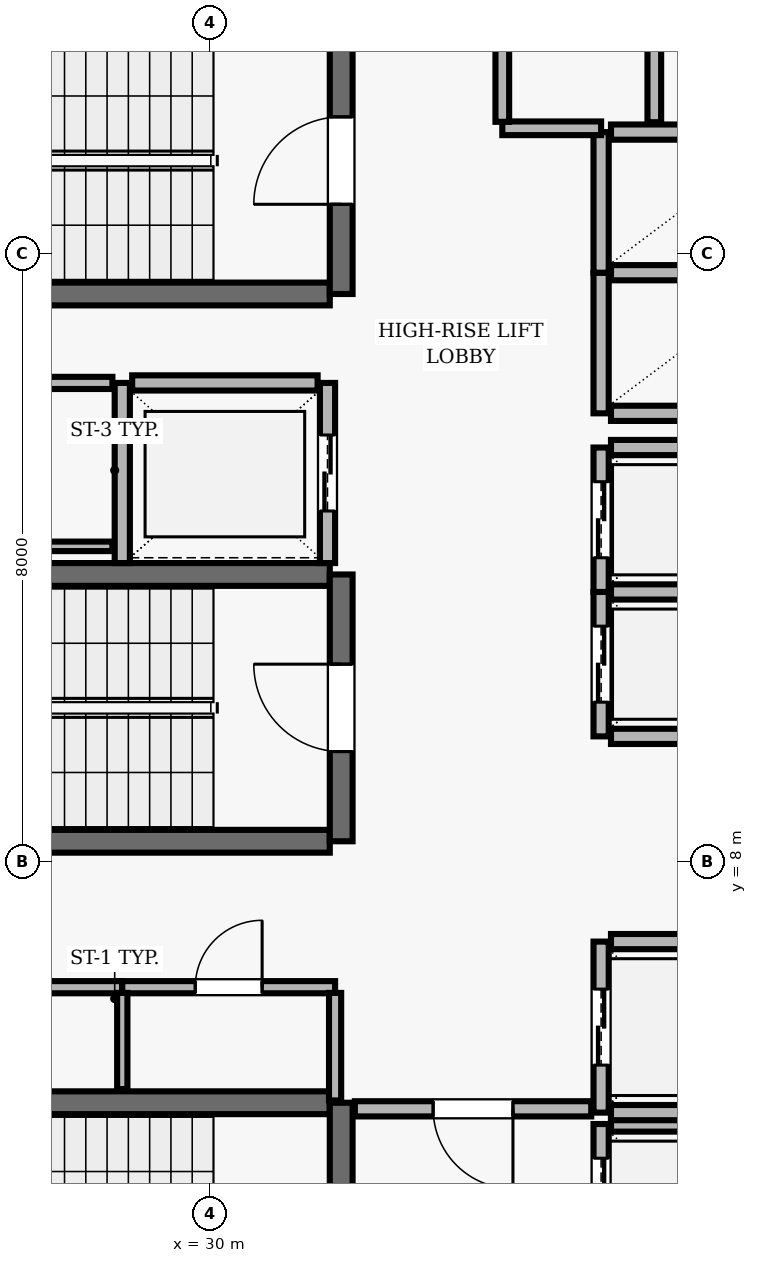
"""IFC4 building model, lengths in metres.
Left out: names, types, materials, properties, quantities, classifications, styles, units other than length and angle.
Written with IfcOpenShell. Run it as: python <this file> out.ifc"""

import sys

from ifc_helpers import new_model, si_unit, direction, frame, frame_2d, origin, place, context, subcontext, project, spatial, rectangle, extrude, element, fill, save


model = new_model("IFC4")
c1 = context("Model", 3, precision=1e-05, world=origin(), true_north=direction((0.0, 1.0)))
c2 = subcontext(c1, "Body", "Model", "MODEL_VIEW")
j1 = project(units=[si_unit("LENGTHUNIT", "METRE"), si_unit("PLANEANGLEUNIT", "RADIAN")], contexts=[c1])
p1 = place(None, origin())
s1 = spatial("IfcSite", under=j1, at=p1, CompositionType="ELEMENT")
p2 = place(p1, origin())
s2 = spatial("IfcBuilding", under=s1, at=p2, CompositionType="ELEMENT")
p3 = place(p2, frame((0.0, 0.0, 298.9)))
s3 = spatial("IfcBuildingStorey", under=s2, at=p3, CompositionType="ELEMENT", Elevation=298.9)
p4 = place(p3, frame((31.58, 4.83, 0.0), z_axis=(0.0, 0.0, 1.0), x_axis=(-1.0, 0.0, 0.0)))
e1 = element("IfcWall", 1, at=p4, inside=s3, PredefinedType="SHEAR", context=c2, shape_type="SweptSolid", body=[
    extrude(rectangle(XDim=8.36, YDim=0.3, at=frame_2d((4.18, 0.0))), origin(), (0.0, 0.0, 1.0), 3.69),
])
p5 = place(p3, frame((31.73, 0.96, 0.0), z_axis=(0.0, 0.0, 1.0), x_axis=(0.0, 1.0, 0.0)))
e2 = element("IfcWall", 2, at=p5, inside=s3, PredefinedType="SHEAR", context=c2, shape_type="SweptSolid", body=[
    extrude(rectangle(XDim=3.87, YDim=0.3, at=frame_2d((1.935, 0.0))), origin(), (0.0, 0.0, 1.0), 3.69),
])
p6 = place(p5, frame((1.54, 0.0, 0.0)))
e3 = element("IfcOpeningElement", 3, at=p6, cuts=e2, PredefinedType="OPENING", context=c2, shape_type="SweptSolid", body=[
    extrude(rectangle(XDim=1.15, YDim=2.15, at=frame_2d((0.575, 1.075))), frame((0.0, 0.16, 0.0), z_axis=(0.0, -1.0, 0.0), x_axis=(1.0, 0.0, 0.0)), (0.0, 0.0, 1.0), 0.32),
])
p7 = place(p3, frame((23.22, 15.47, 0.0), z_axis=(0.0, 0.0, 1.0), x_axis=(1.0, 0.0, 0.0)))
e4 = element("IfcWall", 4, at=p7, inside=s3, PredefinedType="SHEAR", context=c2, shape_type="SweptSolid", body=[
    extrude(rectangle(XDim=8.36, YDim=0.3, at=frame_2d((4.18, 0.0))), origin(), (0.0, 0.0, 1.0), 3.69),
])
p8 = place(p3, frame((31.73, 15.47, 0.0), z_axis=(0.0, 0.0, 1.0), x_axis=(0.0, 1.0, 0.0)))
e5 = element("IfcWall", 5, at=p8, inside=s3, PredefinedType="SHEAR", context=c2, shape_type="SweptSolid", body=[
    extrude(rectangle(XDim=3.51, YDim=0.3, at=frame_2d((1.755, 0.0))), origin(), (0.0, 0.0, 1.0), 3.69),
])
p9 = place(p8, frame((1.18, 0.0, 0.0)))
e6 = element("IfcOpeningElement", 6, at=p9, cuts=e5, PredefinedType="OPENING", context=c2, shape_type="SweptSolid", body=[
    extrude(rectangle(XDim=1.15, YDim=2.15, at=frame_2d((0.575, 1.075))), frame((0.0, 0.16, 0.0), z_axis=(0.0, -1.0, 0.0), x_axis=(1.0, 0.0, 0.0)), (0.0, 0.0, 1.0), 0.32),
])
for number, where, z_axis, x_axis in (
    (7, (31.58, 11.78, 0.0), (0.0, 0.0, 1.0), (-1.0, 0.0, 0.0)),
    (8, (23.22, 8.27, 0.0), (0.0, 0.0, 1.0), (1.0, 0.0, 0.0)),
):
    element("IfcWall", number, at=place(p3, frame(where, z_axis=z_axis, x_axis=x_axis)), inside=s3, PredefinedType="SHEAR", context=c2, shape_type="SweptSolid", body=[
        extrude(rectangle(XDim=8.36, YDim=0.3, at=frame_2d((4.18, 0.0))), origin(), (0.0, 0.0, 1.0), 3.69),
    ])
p10 = place(p3, frame((31.73, 8.27, 0.0), z_axis=(0.0, 0.0, 1.0), x_axis=(0.0, 1.0, 0.0)))
e9 = element("IfcWall", 9, at=p10, inside=s3, PredefinedType="SHEAR", context=c2, shape_type="SweptSolid", body=[
    extrude(rectangle(XDim=3.51, YDim=0.3, at=frame_2d((1.755, 0.0))), origin(), (0.0, 0.0, 1.0), 3.69),
])
p11 = place(p10, frame((1.18, 0.0, 0.0)))
e10 = element("IfcOpeningElement", 10, at=p11, cuts=e9, PredefinedType="OPENING", context=c2, shape_type="SweptSolid", body=[
    extrude(rectangle(XDim=1.15, YDim=2.15, at=frame_2d((0.575, 1.075))), frame((0.0, 0.16, 0.0), z_axis=(0.0, -1.0, 0.0), x_axis=(1.0, 0.0, 0.0)), (0.0, 0.0, 1.0), 0.32),
])
p12 = place(p3, frame((35.15, 4.55, 0.0), z_axis=(0.0, 0.0, 1.0), x_axis=(0.0, -1.0, 0.0)))
e11 = element("IfcWall", 11, at=p12, inside=s3, PredefinedType="SOLIDWALL", context=c2, shape_type="SweptSolid", body=[
    extrude(rectangle(XDim=2.1, YDim=0.2, at=frame_2d((1.05, 0.0))), origin(), (0.0, 0.0, 1.0), 3.69),
])
p13 = place(p12, frame((0.45, 0.0, 0.0)))
e12 = element("IfcOpeningElement", 12, at=p13, cuts=e11, PredefinedType="OPENING", context=c2, shape_type="SweptSolid", body=[
    extrude(rectangle(XDim=1.2, YDim=2.15, at=frame_2d((0.6, 1.075))), frame((0.0, 0.11, 0.0), z_axis=(0.0, -1.0, 0.0), x_axis=(1.0, 0.0, 0.0)), (0.0, 0.0, 1.0), 0.22),
])
p14 = place(p3, frame((37.42, 4.55, 0.0), z_axis=(0.0, 0.0, 1.0), x_axis=(-1.0, 0.0, 0.0)))
e13 = element("IfcWall", 13, at=p14, inside=s3, PredefinedType="SOLIDWALL", context=c2, shape_type="SweptSolid", body=[
    extrude(rectangle(XDim=2.14, YDim=0.2, at=frame_2d((1.07, 0.0))), origin(), (0.0, 0.0, 1.0), 3.69),
])
p15 = place(p3, frame((35.15, 6.95, 0.0), z_axis=(0.0, 0.0, 1.0), x_axis=(0.0, -1.0, 0.0)))
e14 = element("IfcWall", 14, at=p15, inside=s3, PredefinedType="SOLIDWALL", context=c2, shape_type="SweptSolid", body=[
    extrude(rectangle(XDim=2.25, YDim=0.2, at=frame_2d((1.125, 0.0))), origin(), (0.0, 0.0, 1.0), 3.69),
])
p16 = place(p15, frame((0.625, 0.0, 0.0)))
e15 = element("IfcOpeningElement", 15, at=p16, cuts=e14, PredefinedType="OPENING", context=c2, shape_type="SweptSolid", body=[
    extrude(rectangle(XDim=1.0, YDim=2.1, at=frame_2d((0.5, 1.05))), frame((0.0, 0.11, 0.0), z_axis=(0.0, -1.0, 0.0), x_axis=(1.0, 0.0, 0.0)), (0.0, 0.0, 1.0), 0.22),
])
for number, where, z_axis, x_axis in (
    (16, (35.28, 4.7, 0.0), (0.0, 0.0, 1.0), (1.0, 0.0, 0.0)),
    (17, (37.42, 6.95, 0.0), (0.0, 0.0, 1.0), (-1.0, 0.0, 0.0)),
):
    element("IfcWall", number, at=place(p3, frame(where, z_axis=z_axis, x_axis=x_axis)), inside=s3, PredefinedType="SOLIDWALL", context=c2, shape_type="SweptSolid", body=[
        extrude(rectangle(XDim=2.14, YDim=0.2, at=frame_2d((1.07, 0.0))), origin(), (0.0, 0.0, 1.0), 3.69),
    ])
p17 = place(p3, frame((35.15, 11.55, 0.0), z_axis=(0.0, 0.0, 1.0), x_axis=(0.0, -1.0, 0.0)))
e18 = element("IfcWall", 18, at=p17, inside=s3, PredefinedType="SOLIDWALL", context=c2, shape_type="SweptSolid", body=[
    extrude(rectangle(XDim=1.9, YDim=0.2, at=frame_2d((0.95, 0.0))), origin(), (0.0, 0.0, 1.0), 3.69),
])
p18 = place(p17, frame((0.45, 0.0, 0.0)))
e19 = element("IfcOpeningElement", 19, at=p18, cuts=e18, PredefinedType="OPENING", context=c2, shape_type="SweptSolid", body=[
    extrude(rectangle(XDim=1.0, YDim=2.1, at=frame_2d((0.5, 1.05))), frame((0.0, 0.11, 0.0), z_axis=(0.0, -1.0, 0.0), x_axis=(1.0, 0.0, 0.0)), (0.0, 0.0, 1.0), 0.22),
])
for number, where, z_axis, x_axis in (
    (20, (35.28, 9.65, 0.0), (0.0, 0.0, 1.0), (1.0, 0.0, 0.0)),
    (21, (37.42, 11.55, 0.0), (0.0, 0.0, 1.0), (-1.0, 0.0, 0.0)),
):
    element("IfcWall", number, at=place(p3, frame(where, z_axis=z_axis, x_axis=x_axis)), inside=s3, PredefinedType="SOLIDWALL", context=c2, shape_type="SweptSolid", body=[
        extrude(rectangle(XDim=2.14, YDim=0.2, at=frame_2d((1.07, 0.0))), origin(), (0.0, 0.0, 1.0), 3.69),
    ])
p19 = place(p3, frame((35.15, 13.45, 0.0), z_axis=(0.0, 0.0, 1.0), x_axis=(0.0, -1.0, 0.0)))
e22 = element("IfcWall", 22, at=p19, inside=s3, PredefinedType="SOLIDWALL", context=c2, shape_type="SweptSolid", body=[
    extrude(rectangle(XDim=1.9, YDim=0.2, at=frame_2d((0.95, 0.0))), origin(), (0.0, 0.0, 1.0), 3.69),
])
p20 = place(p19, frame((0.45, 0.0, 0.0)))
e23 = element("IfcOpeningElement", 23, at=p20, cuts=e22, PredefinedType="OPENING", context=c2, shape_type="SweptSolid", body=[
    extrude(rectangle(XDim=1.0, YDim=2.1, at=frame_2d((0.5, 1.05))), frame((0.0, 0.11, 0.0), z_axis=(0.0, -1.0, 0.0), x_axis=(1.0, 0.0, 0.0)), (0.0, 0.0, 1.0), 0.22),
])
p21 = place(p3, frame((37.42, 13.45, 0.0), z_axis=(0.0, 0.0, 1.0), x_axis=(-1.0, 0.0, 0.0)))
e24 = element("IfcWall", 24, at=p21, inside=s3, PredefinedType="SOLIDWALL", context=c2, shape_type="SweptSolid", body=[
    extrude(rectangle(XDim=2.14, YDim=0.2, at=frame_2d((1.07, 0.0))), origin(), (0.0, 0.0, 1.0), 3.69),
])
p22 = place(p3, frame((28.85, 14.3, 0.0), z_axis=(0.0, 0.0, 1.0), x_axis=(0.0, -1.0, 0.0)))
e25 = element("IfcWall", 25, at=p22, inside=s3, PredefinedType="SOLIDWALL", context=c2, shape_type="SweptSolid", body=[
    extrude(rectangle(XDim=2.37, YDim=0.2, at=frame_2d((1.185, 0.0))), origin(), (0.0, 0.0, 1.0), 3.69),
])
p23 = place(p3, frame((31.55, 11.93, 0.0), z_axis=(0.0, 0.0, 1.0), x_axis=(0.0, 1.0, 0.0)))
e26 = element("IfcWall", 26, at=p23, inside=s3, PredefinedType="SOLIDWALL", context=c2, shape_type="SweptSolid", body=[
    extrude(rectangle(XDim=2.37, YDim=0.2, at=frame_2d((1.185, 0.0))), origin(), (0.0, 0.0, 1.0), 3.69),
])
p24 = place(p23, frame((0.685, 0.0, 0.0)))
e27 = element("IfcOpeningElement", 27, at=p24, cuts=e26, PredefinedType="OPENING", context=c2, shape_type="SweptSolid", body=[
    extrude(rectangle(XDim=1.0, YDim=2.1, at=frame_2d((0.5, 1.05))), frame((0.0, 0.11, 0.0), z_axis=(0.0, -1.0, 0.0), x_axis=(1.0, 0.0, 0.0)), (0.0, 0.0, 1.0), 0.22),
])
p25 = place(p3, frame((31.42, 14.3, 0.0), z_axis=(0.0, 0.0, 1.0), x_axis=(-1.0, 0.0, 0.0)))
e28 = element("IfcWall", 28, at=p25, inside=s3, PredefinedType="SOLIDWALL", context=c2, shape_type="SweptSolid", body=[
    extrude(rectangle(XDim=2.44, YDim=0.2, at=frame_2d((1.22, 0.0))), origin(), (0.0, 0.0, 1.0), 3.69),
])
p26 = place(p3, frame((35.15, 15.75, 0.0), z_axis=(0.0, 0.0, 1.0), x_axis=(0.0, -1.0, 0.0)))
e29 = element("IfcWall", 29, at=p26, inside=s3, PredefinedType="SOLIDWALL", context=c2, shape_type="SweptSolid", body=[
    extrude(rectangle(XDim=1.85, YDim=0.2, at=frame_2d((0.925, 0.0))), origin(), (0.0, 0.0, 1.0), 3.69),
])
for number, where, z_axis, x_axis in (
    (30, (35.28, 13.9, 0.0), (0.0, 0.0, 1.0), (1.0, 0.0, 0.0)),
    (31, (37.42, 15.75, 0.0), (0.0, 0.0, 1.0), (-1.0, 0.0, 0.0)),
):
    element("IfcWall", number, at=place(p3, frame(where, z_axis=z_axis, x_axis=x_axis)), inside=s3, PredefinedType="SOLIDWALL", context=c2, shape_type="SweptSolid", body=[
        extrude(rectangle(XDim=2.14, YDim=0.2, at=frame_2d((1.07, 0.0))), origin(), (0.0, 0.0, 1.0), 3.69),
    ])
p27 = place(p3, frame((35.15, 17.6, 0.0), z_axis=(0.0, 0.0, 1.0), x_axis=(0.0, -1.0, 0.0)))
e32 = element("IfcWall", 32, at=p27, inside=s3, PredefinedType="SOLIDWALL", context=c2, shape_type="SweptSolid", body=[
    extrude(rectangle(XDim=1.85, YDim=0.2, at=frame_2d((0.925, 0.0))), origin(), (0.0, 0.0, 1.0), 3.69),
])
p28 = place(p3, frame((37.42, 17.6, 0.0), z_axis=(0.0, 0.0, 1.0), x_axis=(-1.0, 0.0, 0.0)))
e33 = element("IfcWall", 33, at=p28, inside=s3, PredefinedType="SOLIDWALL", context=c2, shape_type="SweptSolid", body=[
    extrude(rectangle(XDim=2.14, YDim=0.2, at=frame_2d((1.07, 0.0))), origin(), (0.0, 0.0, 1.0), 3.69),
])
p29 = place(p3, frame((24.35, 12.15, 0.0), z_axis=(0.0, 0.0, 1.0), x_axis=(1.0, 0.0, 0.0)))
e34 = element("IfcWall", 34, at=p29, inside=s3, PredefinedType="PARTITIONING", context=c2, shape_type="SweptSolid", body=[
    extrude(rectangle(XDim=4.37, YDim=0.125, at=frame_2d((2.185, 0.0))), origin(), (0.0, 0.0, 1.0), 3.69),
])
p30 = place(p3, frame((24.35, 14.3, 0.0), z_axis=(0.0, 0.0, 1.0), x_axis=(1.0, 0.0, 0.0)))
e35 = element("IfcWall", 35, at=p30, inside=s3, PredefinedType="PARTITIONING", context=c2, shape_type="SweptSolid", body=[
    extrude(rectangle(XDim=4.37, YDim=0.16, at=frame_2d((2.185, 0.0))), origin(), (0.0, 0.0, 1.0), 3.69),
])
p31 = place(p30, frame((1.735, 0.0, 0.0)))
e36 = element("IfcOpeningElement", 36, at=p31, cuts=e35, PredefinedType="OPENING", context=c2, shape_type="SweptSolid", body=[
    extrude(rectangle(XDim=0.9, YDim=2.1, at=frame_2d((0.45, 1.05))), frame((0.0, 0.09, 0.0), z_axis=(0.0, -1.0, 0.0), x_axis=(1.0, 0.0, 0.0)), (0.0, 0.0, 1.0), 0.18),
])
p32 = place(p3, frame((26.0, 6.35, 0.0), z_axis=(0.0, 0.0, 1.0), x_axis=(1.0, 0.0, 0.0)))
e37 = element("IfcWall", 37, at=p32, inside=s3, PredefinedType="PARTITIONING", context=c2, shape_type="SweptSolid", body=[
    extrude(rectangle(XDim=2.85, YDim=0.16, at=frame_2d((1.425, 0.0))), origin(), (0.0, 0.0, 1.0), 3.69),
])
p33 = place(p32, frame((0.985, 0.0, 0.0)))
e38 = element("IfcOpeningElement", 38, at=p33, cuts=e37, PredefinedType="OPENING", context=c2, shape_type="SweptSolid", body=[
    extrude(rectangle(XDim=0.88, YDim=2.1, at=frame_2d((0.44, 1.05))), frame((0.0, 0.09, 0.0), z_axis=(0.0, -1.0, 0.0), x_axis=(1.0, 0.0, 0.0)), (0.0, 0.0, 1.0), 0.18),
])
p34 = place(p3, frame((28.85, 6.35, 0.0), z_axis=(0.0, 0.0, 1.0), x_axis=(1.0, 0.0, 0.0)))
e39 = element("IfcWall", 39, at=p34, inside=s3, PredefinedType="PARTITIONING", context=c2, shape_type="SweptSolid", body=[
    extrude(rectangle(XDim=2.8, YDim=0.16, at=frame_2d((1.4, 0.0))), origin(), (0.0, 0.0, 1.0), 3.69),
])
p35 = place(p34, frame((0.96, 0.0, 0.0)))
e40 = element("IfcOpeningElement", 40, at=p35, cuts=e39, PredefinedType="OPENING", context=c2, shape_type="SweptSolid", body=[
    extrude(rectangle(XDim=0.88, YDim=2.1, at=frame_2d((0.44, 1.05))), frame((0.0, 0.09, 0.0), z_axis=(0.0, -1.0, 0.0), x_axis=(1.0, 0.0, 0.0)), (0.0, 0.0, 1.0), 0.18),
])
p36 = place(p3, frame((33.85, 17.65, 0.0), z_axis=(0.0, 0.0, 1.0), x_axis=(1.0, 0.0, 0.0)))
e41 = element("IfcWall", 41, at=p36, inside=s3, PredefinedType="PARTITIONING", context=c2, shape_type="SweptSolid", body=[
    extrude(rectangle(XDim=1.3, YDim=0.18, at=frame_2d((0.65, 0.0))), origin(), (0.0, 0.0, 1.0), 3.69),
])
p37 = place(p3, frame((35.02, 4.75, 0.0), z_axis=(0.0, 0.0, 1.0), x_axis=(-1.0, 0.0, 0.0)))
e42 = element("IfcWall", 42, at=p37, inside=s3, PredefinedType="SOLIDWALL", context=c2, shape_type="SweptSolid", body=[
    extrude(rectangle(XDim=3.11, YDim=0.2, at=frame_2d((1.555, 0.0))), origin(), (0.0, 0.0, 1.0), 3.69),
])
p38 = place(p37, frame((1.03, 0.0, 0.0)))
e43 = element("IfcOpeningElement", 43, at=p38, cuts=e42, PredefinedType="OPENING", context=c2, shape_type="SweptSolid", body=[
    extrude(rectangle(XDim=1.05, YDim=2.15, at=frame_2d((0.525, 1.075))), frame((0.0, 0.11, 0.0), z_axis=(0.0, -1.0, 0.0), x_axis=(1.0, 0.0, 0.0)), (0.0, 0.0, 1.0), 0.22),
])
p39 = place(p3, frame((28.85, 5.01, 0.0), z_axis=(0.0, 0.0, 1.0), x_axis=(0.0, 1.0, 0.0)))
e44 = element("IfcWall", 44, at=p39, inside=s3, PredefinedType="PARTITIONING", context=c2, shape_type="SweptSolid", body=[
    extrude(rectangle(XDim=1.265, YDim=0.135, at=frame_2d((0.632, 0.0))), origin(), (0.0, 0.0, 1.0), 3.69),
])
p40 = place(p3, frame((31.65, 4.86, 0.0), z_axis=(0.0, 0.0, 1.0), x_axis=(0.0, 1.0, 0.0)))
e45 = element("IfcWall", 45, at=p40, inside=s3, PredefinedType="PARTITIONING", context=c2, shape_type="SweptSolid", body=[
    extrude(rectangle(XDim=1.415, YDim=0.16, at=frame_2d((0.708, 0.0))), origin(), (0.0, 0.0, 1.0), 3.69),
])
p41 = place(p3, frame((33.85, 17.735, 0.0), z_axis=(0.0, 0.0, 1.0), x_axis=(0.0, 1.0, 0.0)))
e46 = element("IfcWall", 46, at=p41, inside=s3, PredefinedType="PARTITIONING", context=c2, shape_type="SweptSolid", body=[
    extrude(rectangle(XDim=6.03, YDim=0.18, at=frame_2d((3.015, 0.0))), origin(), (0.0, 0.0, 1.0), 3.69),
])
p42 = place(p41, frame((2.54, 0.0, 0.0)))
e47 = element("IfcOpeningElement", 47, at=p42, cuts=e46, PredefinedType="OPENING", context=c2, shape_type="SweptSolid", body=[
    extrude(rectangle(XDim=0.95, YDim=2.1, at=frame_2d((0.475, 1.05))), frame((0.0, 0.1, 0.0), z_axis=(0.0, -1.0, 0.0), x_axis=(1.0, 0.0, 0.0)), (0.0, 0.0, 1.0), 0.2),
])
p43 = place(p3, frame((35.85, 17.73, 0.0), z_axis=(0.0, 0.0, 1.0), x_axis=(0.0, 1.0, 0.0)))
e48 = element("IfcWall", 48, at=p43, inside=s3, PredefinedType="PARTITIONING", context=c2, shape_type="SweptSolid", body=[
    extrude(rectangle(XDim=3.412, YDim=0.18, at=frame_2d((1.706, 0.0))), origin(), (0.0, 0.0, 1.0), 3.69),
])
p44 = place(p43, frame((1.256, 0.0, 0.0)))
e49 = element("IfcOpeningElement", 49, at=p44, cuts=e48, PredefinedType="OPENING", context=c2, shape_type="SweptSolid", body=[
    extrude(rectangle(XDim=0.9, YDim=2.1, at=frame_2d((0.45, 1.05))), frame((0.0, 0.1, 0.0), z_axis=(0.0, -1.0, 0.0), x_axis=(1.0, 0.0, 0.0)), (0.0, 0.0, 1.0), 0.2),
])
p45 = place(p9, origin())
e50 = element("IfcDoor", 50, at=p45, inside=s3, OperationType="SINGLE_SWING_LEFT", PredefinedType="DOOR", context=c2, shape_type="SweptSolid", body=[
    extrude(rectangle(XDim=1.15, YDim=2.15, at=frame_2d((0.575, 1.075))), frame((0.0, 0.025, 0.0), z_axis=(0.0, -1.0, 0.0), x_axis=(1.0, 0.0, 0.0)), (0.0, 0.0, 1.0), 0.05),
])
fill(e6, e50)
p46 = place(p11, origin())
e51 = element("IfcDoor", 51, at=p46, inside=s3, OperationType="SINGLE_SWING_RIGHT", PredefinedType="DOOR", context=c2, shape_type="SweptSolid", body=[
    extrude(rectangle(XDim=1.15, YDim=2.15, at=frame_2d((0.575, 1.075))), frame((0.0, 0.025, 0.0), z_axis=(0.0, -1.0, 0.0), x_axis=(1.0, 0.0, 0.0)), (0.0, 0.0, 1.0), 0.05),
])
fill(e10, e51)
p47 = place(p13, origin())
e52 = element("IfcDoor", 52, at=p47, inside=s3, OperationType="DOUBLE_DOOR_SLIDING", PredefinedType="DOOR", context=c2, shape_type="SweptSolid", body=[
    extrude(rectangle(XDim=1.2, YDim=2.15, at=frame_2d((0.6, 1.075))), frame((0.0, 0.025, 0.0), z_axis=(0.0, -1.0, 0.0), x_axis=(1.0, 0.0, 0.0)), (0.0, 0.0, 1.0), 0.05),
])
fill(e12, e52)
p48 = place(p16, origin())
e53 = element("IfcDoor", 53, at=p48, inside=s3, OperationType="DOUBLE_DOOR_SLIDING", PredefinedType="DOOR", context=c2, shape_type="SweptSolid", body=[
    extrude(rectangle(XDim=1.0, YDim=2.1, at=frame_2d((0.5, 1.05))), frame((0.0, 0.025, 0.0), z_axis=(0.0, -1.0, 0.0), x_axis=(1.0, 0.0, 0.0)), (0.0, 0.0, 1.0), 0.05),
])
fill(e15, e53)
p49 = place(p18, origin())
e54 = element("IfcDoor", 54, at=p49, inside=s3, OperationType="DOUBLE_DOOR_SLIDING", PredefinedType="DOOR", context=c2, shape_type="SweptSolid", body=[
    extrude(rectangle(XDim=1.0, YDim=2.1, at=frame_2d((0.5, 1.05))), frame((0.0, 0.025, 0.0), z_axis=(0.0, -1.0, 0.0), x_axis=(1.0, 0.0, 0.0)), (0.0, 0.0, 1.0), 0.05),
])
fill(e19, e54)
p50 = place(p20, origin())
e55 = element("IfcDoor", 55, at=p50, inside=s3, OperationType="DOUBLE_DOOR_SLIDING", PredefinedType="DOOR", context=c2, shape_type="SweptSolid", body=[
    extrude(rectangle(XDim=1.0, YDim=2.1, at=frame_2d((0.5, 1.05))), frame((0.0, 0.025, 0.0), z_axis=(0.0, -1.0, 0.0), x_axis=(1.0, 0.0, 0.0)), (0.0, 0.0, 1.0), 0.05),
])
fill(e23, e55)
p51 = place(p24, origin())
e56 = element("IfcDoor", 56, at=p51, inside=s3, OperationType="DOUBLE_DOOR_SLIDING", PredefinedType="DOOR", context=c2, shape_type="SweptSolid", body=[
    extrude(rectangle(XDim=1.0, YDim=2.1, at=frame_2d((0.5, 1.05))), frame((0.0, 0.025, 0.0), z_axis=(0.0, -1.0, 0.0), x_axis=(1.0, 0.0, 0.0)), (0.0, 0.0, 1.0), 0.05),
])
fill(e27, e56)
p52 = place(p38, origin())
e57 = element("IfcDoor", 57, at=p52, inside=s3, OperationType="SINGLE_SWING_LEFT", PredefinedType="DOOR", context=c2, shape_type="SweptSolid", body=[
    extrude(rectangle(XDim=1.05, YDim=2.15, at=frame_2d((0.525, 1.075))), frame((0.0, 0.025, 0.0), z_axis=(0.0, -1.0, 0.0), x_axis=(1.0, 0.0, 0.0)), (0.0, 0.0, 1.0), 0.05),
])
fill(e43, e57)
p53 = place(p35, origin())
e58 = element("IfcDoor", 58, at=p53, inside=s3, OperationType="SINGLE_SWING_RIGHT", PredefinedType="DOOR", context=c2, shape_type="SweptSolid", body=[
    extrude(rectangle(XDim=0.88, YDim=2.1, at=frame_2d((0.44, 1.05))), frame((0.0, 0.025, 0.0), z_axis=(0.0, -1.0, 0.0), x_axis=(1.0, 0.0, 0.0)), (0.0, 0.0, 1.0), 0.05),
])
fill(e40, e58)
save(model, sys.argv[1])
